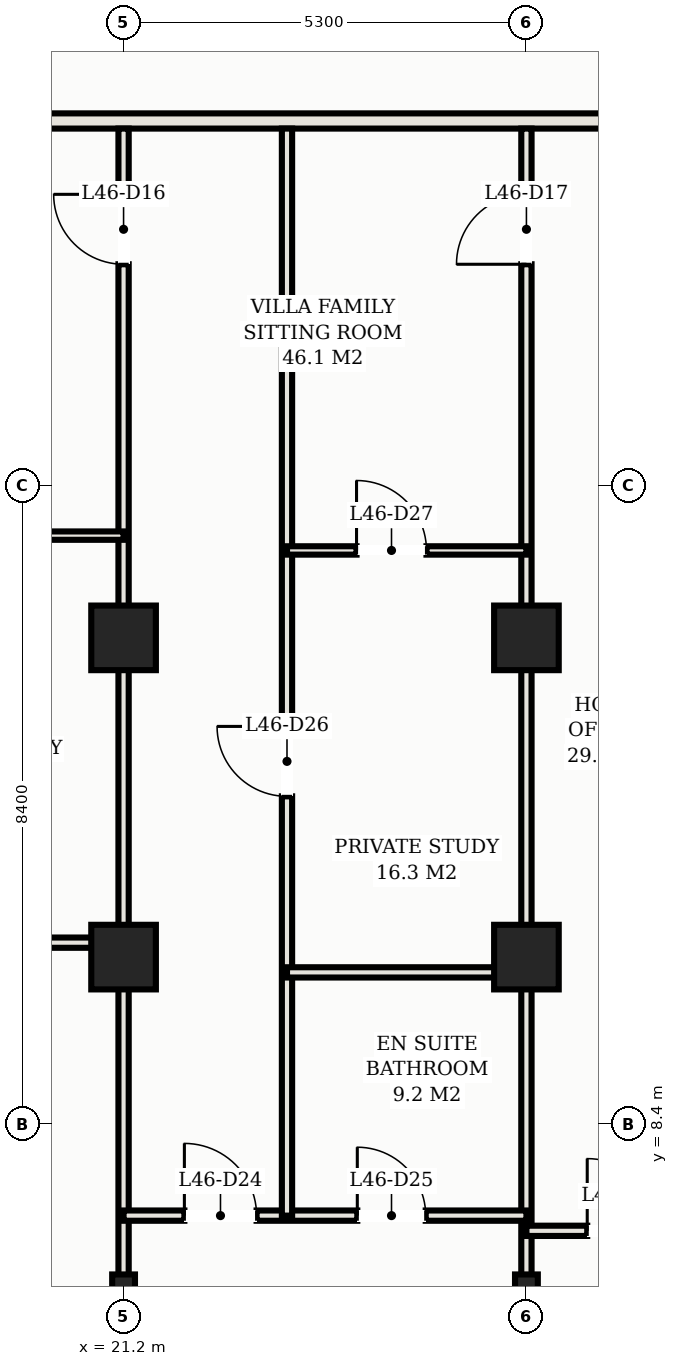
"""IFC4 building model, lengths in metres.
Left out: names, types, materials, properties, quantities, classifications, styles, units other than length and angle.
Written with IfcOpenShell. Run it as: python <this file> out.ifc"""

import sys

from ifc_helpers import new_model, si_unit, direction, frame, frame_2d, origin, origin_2d, place, context, subcontext, project, spatial, rectangle, hollow_rectangle, extrude, element, fill, save


model = new_model("IFC4")
c1 = context("Model", 3, precision=1e-05, world=origin(), true_north=direction((0.0, 1.0)))
c2 = subcontext(c1, "Body", "Model", "MODEL_VIEW")
j1 = project(units=[si_unit("LENGTHUNIT", "METRE"), si_unit("PLANEANGLEUNIT", "RADIAN")], contexts=[c1])
p1 = place(None, origin())
s1 = spatial("IfcSite", under=j1, at=p1, CompositionType="ELEMENT")
p2 = place(p1, origin())
s2 = spatial("IfcBuilding", under=s1, at=p2, CompositionType="ELEMENT")
p3 = place(p2, frame((0.0, 0.0, 168.9)))
s3 = spatial("IfcBuildingStorey", under=s2, at=p3, CompositionType="ELEMENT", Elevation=168.9)
for number, where, z_axis, x_axis in (
    (1, (21.2, 14.8, 0.0), (0.0, 0.0, 1.0), (1.0, 0.0, 0.0)),
    (2, (21.2, 10.6, 0.0), (0.0, 0.0, 1.0), (1.0, 0.0, 0.0)),
    (3, (26.5, 14.8, 0.0), (0.0, 0.0, 1.0), (1.0, 0.0, 0.0)),
    (4, (26.5, 10.6, 0.0), (0.0, 0.0, 1.0), (1.0, 0.0, 0.0)),
):
    element("IfcColumn", number, at=place(p3, frame(where, z_axis=z_axis, x_axis=x_axis)), inside=s3, PredefinedType="COLUMN", context=c2, shape_type="SweptSolid", body=[
        extrude(hollow_rectangle(XDim=0.85, YDim=0.85, WallThickness=0.028, at=origin_2d()), origin(), (0.0, 0.0, 1.0), 3.3),
    ])
for number, where, z_axis, x_axis in (
    (5, (21.2, 6.2, 0.0), (0.0, 0.0, 1.0), (1.0, 0.0, 0.0)),
    (6, (26.5, 6.2, 0.0), (0.0, 0.0, 1.0), (1.0, 0.0, 0.0)),
):
    element("IfcColumn", number, at=place(p3, frame(where, z_axis=z_axis, x_axis=x_axis)), inside=s3, PredefinedType="COLUMN", context=c2, shape_type="SweptSolid", body=[
        extrude(hollow_rectangle(XDim=0.3, YDim=0.45, WallThickness=0.016, at=origin_2d()), origin(), (0.0, 0.0, 1.0), 3.3),
    ])
p4 = place(p3, frame((4.32, 21.6, 0.0), z_axis=(0.0, 0.0, 1.0), x_axis=(1.0, 0.0, 0.0)))
e7 = element("IfcWall", 7, at=p4, inside=s3, PredefinedType="PARTITIONING", context=c2, shape_type="SweptSolid", body=[
    extrude(rectangle(XDim=44.36, YDim=0.2, at=frame_2d((22.18, 0.0))), origin(), (0.0, 0.0, 1.0), 2.38),
])
p5 = place(p4, frame((7.03, 0.0, 0.0)))
e8 = element("IfcOpeningElement", 8, at=p5, cuts=e7, PredefinedType="OPENING", context=c2, shape_type="SweptSolid", body=[
    extrude(rectangle(XDim=1.1, YDim=2.25, at=frame_2d((0.55, 1.125))), frame((0.0, 0.11, 0.0), z_axis=(0.0, -1.0, 0.0), x_axis=(1.0, 0.0, 0.0)), (0.0, 0.0, 1.0), 0.22),
])
p6 = place(p4, frame((2.635, 0.0, 0.0)))
e9 = element("IfcOpeningElement", 9, at=p6, cuts=e7, PredefinedType="OPENING", context=c2, shape_type="SweptSolid", body=[
    extrude(rectangle(XDim=0.92, YDim=2.15, at=frame_2d((0.46, 1.075))), frame((0.0, 0.11, 0.0), z_axis=(0.0, -1.0, 0.0), x_axis=(1.0, 0.0, 0.0)), (0.0, 0.0, 1.0), 0.22),
])
p7 = place(p4, frame((40.805, 0.0, 0.0)))
e10 = element("IfcOpeningElement", 10, at=p7, cuts=e7, PredefinedType="OPENING", context=c2, shape_type="SweptSolid", body=[
    extrude(rectangle(XDim=0.92, YDim=2.15, at=frame_2d((0.46, 1.075))), frame((0.0, 0.11, 0.0), z_axis=(0.0, -1.0, 0.0), x_axis=(1.0, 0.0, 0.0)), (0.0, 0.0, 1.0), 0.22),
])
p8 = place(p3, frame((21.2, 2.508, 0.0), z_axis=(0.0, 0.0, 1.0), x_axis=(0.0, 1.0, 0.0)))
e11 = element("IfcWall", 11, at=p8, inside=s3, PredefinedType="PARTITIONING", context=c2, shape_type="SweptSolid", body=[
    extrude(rectangle(XDim=18.992, YDim=0.135, at=frame_2d((9.496, 0.0))), origin(), (0.0, 0.0, 1.0), 2.38),
])
p9 = place(p8, frame((17.207, 0.0, 0.0)))
e12 = element("IfcOpeningElement", 12, at=p9, cuts=e11, PredefinedType="OPENING", context=c2, shape_type="SweptSolid", body=[
    extrude(rectangle(XDim=0.92, YDim=2.15, at=frame_2d((0.46, 1.075))), frame((0.0, 0.078, 0.0), z_axis=(0.0, -1.0, 0.0), x_axis=(1.0, 0.0, 0.0)), (0.0, 0.0, 1.0), 0.155),
])
p10 = place(p3, frame((26.5, 1.82, 0.0), z_axis=(0.0, 0.0, 1.0), x_axis=(0.0, 1.0, 0.0)))
e13 = element("IfcWall", 13, at=p10, inside=s3, PredefinedType="PARTITIONING", context=c2, shape_type="SweptSolid", body=[
    extrude(rectangle(XDim=19.68, YDim=0.135, at=frame_2d((9.84, 0.0))), origin(), (0.0, 0.0, 1.0), 2.38),
])
p11 = place(p10, frame((17.895, 0.0, 0.0)))
e14 = element("IfcOpeningElement", 14, at=p11, cuts=e13, PredefinedType="OPENING", context=c2, shape_type="SweptSolid", body=[
    extrude(rectangle(XDim=0.92, YDim=2.15, at=frame_2d((0.46, 1.075))), frame((0.0, 0.078, 0.0), z_axis=(0.0, -1.0, 0.0), x_axis=(1.0, 0.0, 0.0)), (0.0, 0.0, 1.0), 0.155),
])
p12 = place(p3, frame((10.6, 10.79, 0.0), z_axis=(0.0, 0.0, 1.0), x_axis=(1.0, 0.0, 0.0)))
e15 = element("IfcWall", 15, at=p12, inside=s3, PredefinedType="PARTITIONING", context=c2, shape_type="SweptSolid", body=[
    extrude(rectangle(XDim=10.6, YDim=0.135, at=frame_2d((5.3, 0.0))), origin(), (0.0, 0.0, 1.0), 2.38),
])
p13 = place(p12, frame((0.425, 0.0, 0.0)))
e16 = element("IfcOpeningElement", 16, at=p13, cuts=e15, PredefinedType="OPENING", context=c2, shape_type="SweptSolid", body=[
    extrude(rectangle(XDim=1.5, YDim=2.25, at=frame_2d((0.75, 1.125))), frame((0.0, 0.078, 0.0), z_axis=(0.0, -1.0, 0.0), x_axis=(1.0, 0.0, 0.0)), (0.0, 0.0, 1.0), 0.155),
])
p14 = place(p3, frame((15.9, 16.145, 0.0), z_axis=(0.0, 0.0, 1.0), x_axis=(1.0, 0.0, 0.0)))
e17 = element("IfcWall", 17, at=p14, inside=s3, PredefinedType="MOVABLE", context=c2, shape_type="SweptSolid", body=[
    extrude(rectangle(XDim=5.3, YDim=0.11, at=frame_2d((2.65, 0.0))), origin(), (0.0, 0.0, 1.0), 2.38),
])
p15 = place(p14, frame((1.84, 0.0, 0.0)))
e18 = element("IfcOpeningElement", 18, at=p15, cuts=e17, PredefinedType="OPENING", context=c2, shape_type="SweptSolid", body=[
    extrude(rectangle(XDim=0.92, YDim=2.15, at=frame_2d((0.46, 1.075))), frame((0.0, 0.065, 0.0), z_axis=(0.0, -1.0, 0.0), x_axis=(1.0, 0.0, 0.0)), (0.0, 0.0, 1.0), 0.13),
])
p16 = place(p3, frame((21.2, 7.199, 0.0), z_axis=(0.0, 0.0, 1.0), x_axis=(1.0, 0.0, 0.0)))
e19 = element("IfcWall", 19, at=p16, inside=s3, PredefinedType="PARTITIONING", context=c2, shape_type="SweptSolid", body=[
    extrude(rectangle(XDim=5.3, YDim=0.135, at=frame_2d((2.65, 0.0))), origin(), (0.0, 0.0, 1.0), 2.38),
])
p17 = place(p16, frame((0.8, 0.0, 0.0)))
e20 = element("IfcOpeningElement", 20, at=p17, cuts=e19, PredefinedType="OPENING", context=c2, shape_type="SweptSolid", body=[
    extrude(rectangle(XDim=0.95, YDim=2.15, at=frame_2d((0.475, 1.075))), frame((0.0, 0.078, 0.0), z_axis=(0.0, -1.0, 0.0), x_axis=(1.0, 0.0, 0.0)), (0.0, 0.0, 1.0), 0.155),
])
p18 = place(p16, frame((3.075, 0.0, 0.0)))
e21 = element("IfcOpeningElement", 21, at=p18, cuts=e19, PredefinedType="OPENING", context=c2, shape_type="SweptSolid", body=[
    extrude(rectangle(XDim=0.9, YDim=2.15, at=frame_2d((0.45, 1.075))), frame((0.0, 0.078, 0.0), z_axis=(0.0, -1.0, 0.0), x_axis=(1.0, 0.0, 0.0)), (0.0, 0.0, 1.0), 0.155),
])
p19 = place(p3, frame((23.35, 7.199, 0.0), z_axis=(0.0, 0.0, 1.0), x_axis=(0.0, 1.0, 0.0)))
e22 = element("IfcWall", 22, at=p19, inside=s3, PredefinedType="PARTITIONING", context=c2, shape_type="SweptSolid", body=[
    extrude(rectangle(XDim=14.301, YDim=0.135, at=frame_2d((7.15, 0.0))), origin(), (0.0, 0.0, 1.0), 2.38),
])
p20 = place(p19, frame((5.516, 0.0, 0.0)))
e23 = element("IfcOpeningElement", 23, at=p20, cuts=e22, PredefinedType="OPENING", context=c2, shape_type="SweptSolid", body=[
    extrude(rectangle(XDim=0.92, YDim=2.15, at=frame_2d((0.46, 1.075))), frame((0.0, 0.078, 0.0), z_axis=(0.0, -1.0, 0.0), x_axis=(1.0, 0.0, 0.0)), (0.0, 0.0, 1.0), 0.155),
])
p21 = place(p3, frame((23.35, 10.399, 0.0), z_axis=(0.0, 0.0, 1.0), x_axis=(1.0, 0.0, 0.0)))
e24 = element("IfcWall", 24, at=p21, inside=s3, PredefinedType="PARTITIONING", context=c2, shape_type="SweptSolid", body=[
    extrude(rectangle(XDim=3.15, YDim=0.135, at=frame_2d((1.575, 0.0))), origin(), (0.0, 0.0, 1.0), 2.38),
])
p22 = place(p3, frame((23.35, 15.95, 0.0), z_axis=(0.0, 0.0, 1.0), x_axis=(1.0, 0.0, 0.0)))
e25 = element("IfcWall", 25, at=p22, inside=s3, PredefinedType="MOVABLE", context=c2, shape_type="SweptSolid", body=[
    extrude(rectangle(XDim=3.15, YDim=0.11, at=frame_2d((1.575, 0.0))), origin(), (0.0, 0.0, 1.0), 2.38),
])
p23 = place(p22, frame((0.915, 0.0, 0.0)))
e26 = element("IfcOpeningElement", 26, at=p23, cuts=e25, PredefinedType="OPENING", context=c2, shape_type="SweptSolid", body=[
    extrude(rectangle(XDim=0.92, YDim=2.15, at=frame_2d((0.46, 1.075))), frame((0.0, 0.065, 0.0), z_axis=(0.0, -1.0, 0.0), x_axis=(1.0, 0.0, 0.0)), (0.0, 0.0, 1.0), 0.13),
])
p24 = place(p3, frame((26.5, 6.999, 0.0), z_axis=(0.0, 0.0, 1.0), x_axis=(1.0, 0.0, 0.0)))
e27 = element("IfcWall", 27, at=p24, inside=s3, PredefinedType="PARTITIONING", context=c2, shape_type="SweptSolid", body=[
    extrude(rectangle(XDim=5.3, YDim=0.135, at=frame_2d((2.65, 0.0))), origin(), (0.0, 0.0, 1.0), 2.38),
])
p25 = place(p24, frame((0.8, 0.0, 0.0)))
e28 = element("IfcOpeningElement", 28, at=p25, cuts=e27, PredefinedType="OPENING", context=c2, shape_type="SweptSolid", body=[
    extrude(rectangle(XDim=0.95, YDim=2.15, at=frame_2d((0.475, 1.075))), frame((0.0, 0.078, 0.0), z_axis=(0.0, -1.0, 0.0), x_axis=(1.0, 0.0, 0.0)), (0.0, 0.0, 1.0), 0.155),
])
p26 = place(p9, origin())
e29 = element("IfcDoor", 29, at=p26, inside=s3, OperationType="SINGLE_SWING_RIGHT", PredefinedType="DOOR", context=c2, shape_type="SweptSolid", body=[
    extrude(rectangle(XDim=0.92, YDim=2.15, at=frame_2d((0.46, 1.075))), frame((0.0, 0.025, 0.0), z_axis=(0.0, -1.0, 0.0), x_axis=(1.0, 0.0, 0.0)), (0.0, 0.0, 1.0), 0.05),
])
fill(e12, e29)
p27 = place(p11, origin())
e30 = element("IfcDoor", 30, at=p27, inside=s3, OperationType="SINGLE_SWING_LEFT", PredefinedType="DOOR", context=c2, shape_type="SweptSolid", body=[
    extrude(rectangle(XDim=0.92, YDim=2.15, at=frame_2d((0.46, 1.075))), frame((0.0, 0.025, 0.0), z_axis=(0.0, -1.0, 0.0), x_axis=(1.0, 0.0, 0.0)), (0.0, 0.0, 1.0), 0.05),
])
fill(e14, e30)
p28 = place(p17, origin())
e31 = element("IfcDoor", 31, at=p28, inside=s3, OperationType="SINGLE_SWING_LEFT", PredefinedType="DOOR", context=c2, shape_type="SweptSolid", body=[
    extrude(rectangle(XDim=0.95, YDim=2.15, at=frame_2d((0.475, 1.075))), frame((0.0, 0.025, 0.0), z_axis=(0.0, -1.0, 0.0), x_axis=(1.0, 0.0, 0.0)), (0.0, 0.0, 1.0), 0.05),
])
fill(e20, e31)
p29 = place(p18, origin())
e32 = element("IfcDoor", 32, at=p29, inside=s3, OperationType="SINGLE_SWING_LEFT", PredefinedType="DOOR", context=c2, shape_type="SweptSolid", body=[
    extrude(rectangle(XDim=0.9, YDim=2.15, at=frame_2d((0.45, 1.075))), frame((0.0, 0.025, 0.0), z_axis=(0.0, -1.0, 0.0), x_axis=(1.0, 0.0, 0.0)), (0.0, 0.0, 1.0), 0.05),
])
fill(e21, e32)
p30 = place(p20, origin())
e33 = element("IfcDoor", 33, at=p30, inside=s3, OperationType="SINGLE_SWING_RIGHT", PredefinedType="DOOR", context=c2, shape_type="SweptSolid", body=[
    extrude(rectangle(XDim=0.92, YDim=2.15, at=frame_2d((0.46, 1.075))), frame((0.0, 0.025, 0.0), z_axis=(0.0, -1.0, 0.0), x_axis=(1.0, 0.0, 0.0)), (0.0, 0.0, 1.0), 0.05),
])
fill(e23, e33)
p31 = place(p23, origin())
e34 = element("IfcDoor", 34, at=p31, inside=s3, OperationType="SINGLE_SWING_LEFT", PredefinedType="DOOR", context=c2, shape_type="SweptSolid", body=[
    extrude(rectangle(XDim=0.92, YDim=2.15, at=frame_2d((0.46, 1.075))), frame((0.0, 0.025, 0.0), z_axis=(0.0, -1.0, 0.0), x_axis=(1.0, 0.0, 0.0)), (0.0, 0.0, 1.0), 0.05),
])
fill(e26, e34)
p32 = place(p25, origin())
e35 = element("IfcDoor", 35, at=p32, inside=s3, OperationType="SINGLE_SWING_LEFT", PredefinedType="DOOR", context=c2, shape_type="SweptSolid", body=[
    extrude(rectangle(XDim=0.95, YDim=2.15, at=frame_2d((0.475, 1.075))), frame((0.0, 0.025, 0.0), z_axis=(0.0, -1.0, 0.0), x_axis=(1.0, 0.0, 0.0)), (0.0, 0.0, 1.0), 0.05),
])
fill(e28, e35)
save(model, sys.argv[1])
